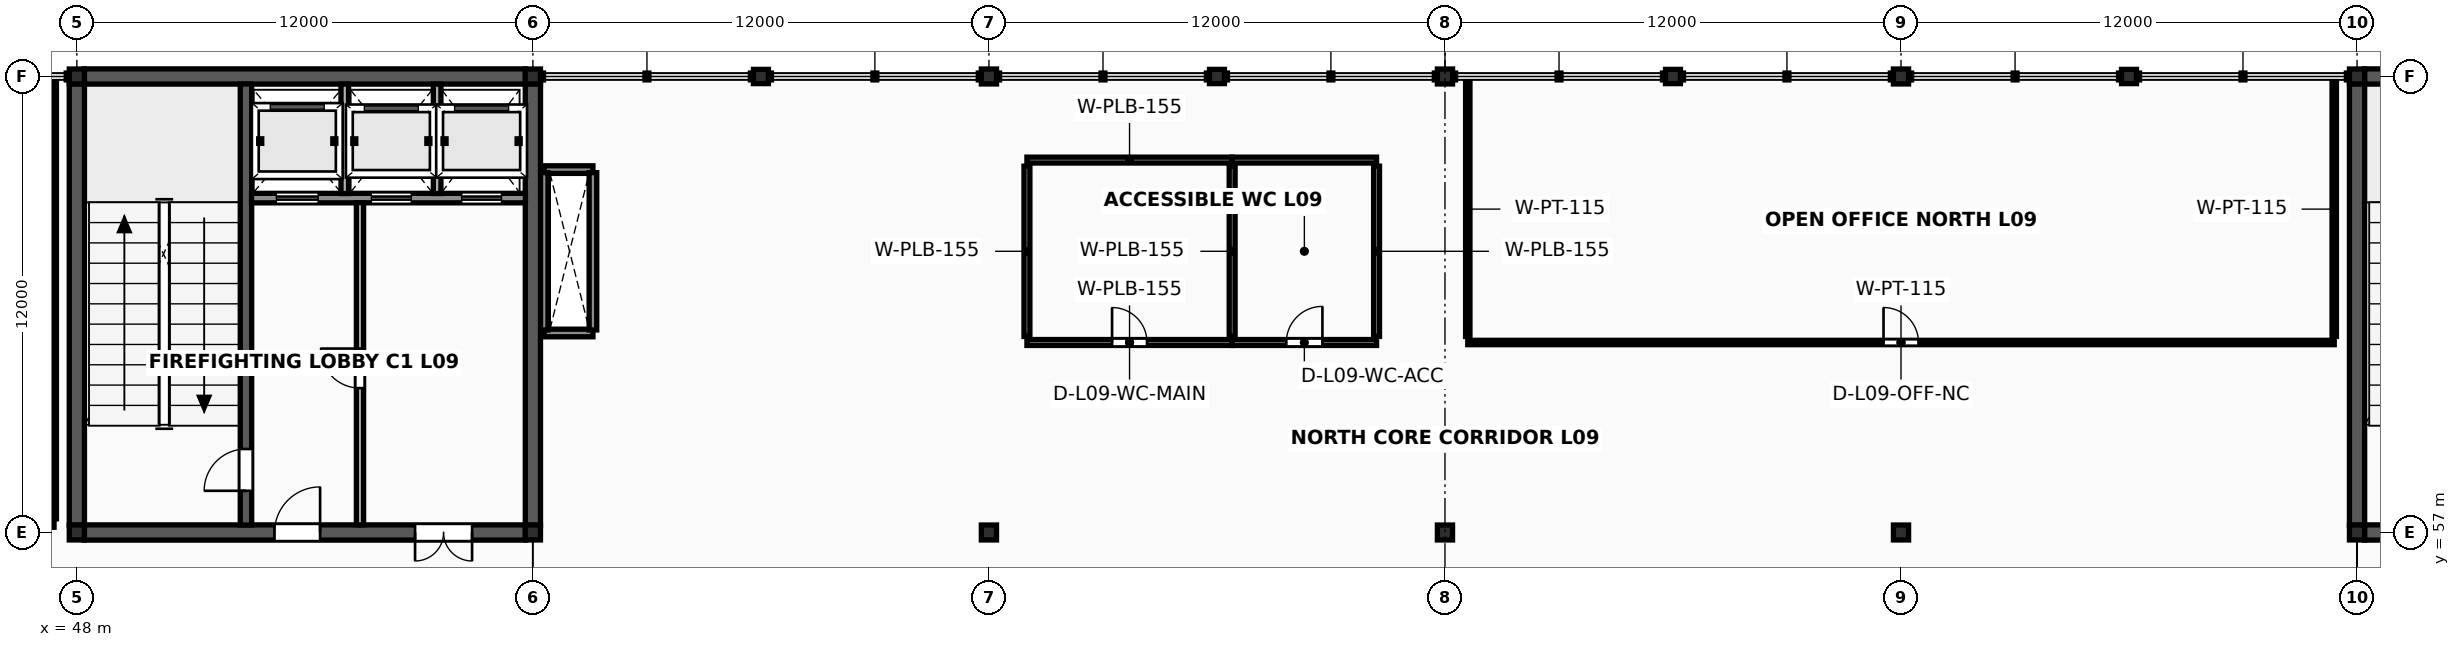
"""IFC4 building model, lengths in metres.
Left out: names, types, materials, properties, quantities, classifications, styles, units other than length and angle.
Written with IfcOpenShell. Run it as: python <this file> out.ifc"""

import sys

from ifc_helpers import new_model, si_unit, direction, frame, frame_2d, origin, origin_2d, place, context, subcontext, project, spatial, rectangle, i_section, extrude, element, fill, save


model = new_model("IFC4")
c1 = context("Model", 3, precision=1e-05, world=origin(), true_north=direction((0.0, 1.0)))
c2 = subcontext(c1, "Body", "Model", "MODEL_VIEW")
j1 = project(units=[si_unit("LENGTHUNIT", "METRE"), si_unit("PLANEANGLEUNIT", "RADIAN")], contexts=[c1])
p1 = place(None, origin())
s1 = spatial("IfcSite", under=j1, at=p1, CompositionType="ELEMENT")
p2 = place(p1, origin())
s2 = spatial("IfcBuilding", under=s1, at=p2, CompositionType="ELEMENT")
p3 = place(p2, frame((0.0, 0.0, 37.6)))
s3 = spatial("IfcBuildingStorey", under=s2, at=p3, CompositionType="ELEMENT", Elevation=37.6)
for number, where, z_axis, x_axis in (
    (1, (48.0, 57.0, 0.0), (0.0, 0.0, 1.0), (1.0, 0.0, 0.0)),
    (2, (48.0, 69.0, 0.0), (0.0, 0.0, 1.0), (1.0, 0.0, 0.0)),
    (3, (60.0, 57.0, 0.0), (0.0, 0.0, 1.0), (1.0, 0.0, 0.0)),
    (4, (60.0, 69.0, 0.0), (0.0, 0.0, 1.0), (1.0, 0.0, 0.0)),
    (5, (72.0, 57.0, 0.0), (0.0, 0.0, 1.0), (1.0, 0.0, 0.0)),
    (6, (72.0, 69.0, 0.0), (0.0, 0.0, 1.0), (1.0, 0.0, 0.0)),
    (7, (84.0, 57.0, 0.0), (0.0, 0.0, 1.0), (1.0, 0.0, 0.0)),
    (8, (84.0, 69.0, 0.0), (0.0, 0.0, 1.0), (1.0, 0.0, 0.0)),
    (9, (96.0, 57.0, 0.0), (0.0, 0.0, 1.0), (1.0, 0.0, 0.0)),
    (10, (96.0, 69.0, 0.0), (0.0, 0.0, 1.0), (1.0, 0.0, 0.0)),
    (11, (108.0, 57.0, 0.0), (0.0, 0.0, 1.0), (1.0, 0.0, 0.0)),
    (12, (108.0, 69.0, 0.0), (0.0, 0.0, 1.0), (1.0, 0.0, 0.0)),
):
    element("IfcColumn", number, at=place(p3, frame(where, z_axis=z_axis, x_axis=x_axis)), inside=s3, PredefinedType="COLUMN", context=c2, shape_type="SweptSolid", body=[
        extrude(i_section(OverallWidth=0.399, OverallDepth=0.393, WebThickness=0.023, FlangeThickness=0.037, FilletRadius=0.018, at=origin_2d()), origin(), (0.0, 0.0, 1.0), 4.0),
    ])
for number, where, z_axis, x_axis in (
    (13, (66.0, 69.0, 0.0), (0.0, 0.0, 1.0), (1.0, 0.0, 0.0)),
    (14, (78.0, 69.0, 0.0), (0.0, 0.0, 1.0), (1.0, 0.0, 0.0)),
    (15, (90.0, 69.0, 0.0), (0.0, 0.0, 1.0), (1.0, 0.0, 0.0)),
    (16, (102.0, 69.0, 0.0), (0.0, 0.0, 1.0), (1.0, 0.0, 0.0)),
):
    element("IfcColumn", number, at=place(p3, frame(where, z_axis=z_axis, x_axis=x_axis)), inside=s3, PredefinedType="COLUMN", context=c2, shape_type="SweptSolid", body=[
        extrude(i_section(OverallWidth=0.394, OverallDepth=0.375, WebThickness=0.017, FlangeThickness=0.028, FilletRadius=0.018, at=origin_2d()), origin(), (0.0, 0.0, 1.0), 4.0),
    ])
for number, where, z_axis, x_axis in (
    (17, (60.297, 62.25, 0.0), (0.0, 0.0, 1.0), (1.0, 0.0, 0.0)),
    (18, (60.297, 66.55, 0.0), (0.0, 0.0, 1.0), (1.0, 0.0, 0.0)),
):
    element("IfcWall", number, at=place(p3, frame(where, z_axis=z_axis, x_axis=x_axis)), inside=s3, PredefinedType="SOLIDWALL", context=c2, shape_type="SweptSolid", body=[
        extrude(rectangle(XDim=1.283, YDim=0.2, at=frame_2d((0.642, 0.0))), origin(), (0.0, 0.0, 1.0), 3.838),
    ])
for number, where, z_axis, x_axis in (
    (19, (60.297, 62.33, 0.0), (0.0, 0.0, 1.0), (0.0, 1.0, 0.0)),
    (20, (61.58, 62.33, 0.0), (0.0, 0.0, 1.0), (0.0, 1.0, 0.0)),
):
    element("IfcWall", number, at=place(p3, frame(where, z_axis=z_axis, x_axis=x_axis)), inside=s3, PredefinedType="SOLIDWALL", context=c2, shape_type="SweptSolid", body=[
        extrude(rectangle(XDim=4.14, YDim=0.2, at=frame_2d((2.07, 0.0))), origin(), (0.0, 0.0, 1.0), 3.838),
    ])
p4 = place(p3, frame((48.197, 57.0, 0.0), z_axis=(0.0, 0.0, 1.0), x_axis=(1.0, 0.0, 0.0)))
e21 = element("IfcWall", 21, at=p4, inside=s3, PredefinedType="SHEAR", context=c2, shape_type="SweptSolid", body=[
    extrude(rectangle(XDim=11.607, YDim=0.4, at=frame_2d((5.803, 0.0))), origin(), (0.0, 0.0, 1.0), 3.838),
])
p5 = place(p4, frame((5.004, 0.0, 0.0)))
e22 = element("IfcOpeningElement", 22, at=p5, cuts=e21, PredefinedType="OPENING", context=c2, shape_type="SweptSolid", body=[
    extrude(rectangle(XDim=1.2, YDim=2.2, at=frame_2d((0.6, 1.1))), frame((0.0, 0.215, 0.0), z_axis=(0.0, -1.0, 0.0), x_axis=(1.0, 0.0, 0.0)), (0.0, 0.0, 1.0), 0.43),
])
p6 = place(p4, frame((8.703, 0.0, 0.0)))
e23 = element("IfcOpeningElement", 23, at=p6, cuts=e21, PredefinedType="OPENING", context=c2, shape_type="SweptSolid", body=[
    extrude(rectangle(XDim=1.5, YDim=2.25, at=frame_2d((0.75, 1.125))), frame((0.0, 0.215, 0.0), z_axis=(0.0, -1.0, 0.0), x_axis=(1.0, 0.0, 0.0)), (0.0, 0.0, 1.0), 0.43),
])
p7 = place(p3, frame((48.197, 69.0, 0.0), z_axis=(0.0, 0.0, 1.0), x_axis=(1.0, 0.0, 0.0)))
e24 = element("IfcWall", 24, at=p7, inside=s3, PredefinedType="SHEAR", context=c2, shape_type="SweptSolid", body=[
    extrude(rectangle(XDim=11.607, YDim=0.4, at=frame_2d((5.803, 0.0))), origin(), (0.0, 0.0, 1.0), 3.838),
])
for number, where, z_axis, x_axis in (
    (25, (48.0, 57.194, 0.0), (0.0, 0.0, 1.0), (0.0, 1.0, 0.0)),
    (26, (60.0, 57.194, 0.0), (0.0, 0.0, 1.0), (0.0, 1.0, 0.0)),
):
    element("IfcWall", number, at=place(p3, frame(where, z_axis=z_axis, x_axis=x_axis)), inside=s3, PredefinedType="SHEAR", context=c2, shape_type="SweptSolid", body=[
        extrude(rectangle(XDim=11.613, YDim=0.4, at=frame_2d((5.806, 0.0))), origin(), (0.0, 0.0, 1.0), 3.838),
    ])
p8 = place(p3, frame((52.45, 57.197, 0.0), z_axis=(0.0, 0.0, 1.0), x_axis=(0.0, 1.0, 0.0)))
e27 = element("IfcWall", 27, at=p8, inside=s3, PredefinedType="SHEAR", context=c2, shape_type="SweptSolid", body=[
    extrude(rectangle(XDim=11.606, YDim=0.3, at=frame_2d((5.803, 0.0))), origin(), (0.0, 0.0, 1.0), 3.838),
])
p9 = place(p8, frame((0.9, 0.0, 0.0)))
e28 = element("IfcOpeningElement", 28, at=p9, cuts=e27, PredefinedType="OPENING", context=c2, shape_type="SweptSolid", body=[
    extrude(rectangle(XDim=1.1, YDim=2.2, at=frame_2d((0.55, 1.1))), frame((0.0, 0.165, 0.0), z_axis=(0.0, -1.0, 0.0), x_axis=(1.0, 0.0, 0.0)), (0.0, 0.0, 1.0), 0.33),
])
p10 = place(p3, frame((52.597, 65.8, 0.0), z_axis=(0.0, 0.0, 1.0), x_axis=(1.0, 0.0, 0.0)))
e29 = element("IfcWall", 29, at=p10, inside=s3, PredefinedType="SOLIDWALL", context=c2, shape_type="SweptSolid", body=[
    extrude(rectangle(XDim=7.206, YDim=0.25, at=frame_2d((3.603, 0.0))), origin(), (0.0, 0.0, 1.0), 3.838),
])
p11 = place(p10, frame((0.653, 0.0, 0.0)))
e30 = element("IfcOpeningElement", 30, at=p11, cuts=e29, PredefinedType="OPENING", context=c2, shape_type="SweptSolid", body=[
    extrude(rectangle(XDim=1.1, YDim=2.24, at=frame_2d((0.55, 1.12))), frame((0.0, 0.14, 0.0), z_axis=(0.0, -1.0, 0.0), x_axis=(1.0, 0.0, 0.0)), (0.0, 0.0, 1.0), 0.28),
])
p12 = place(p10, frame((3.153, 0.0, 0.0)))
e31 = element("IfcOpeningElement", 31, at=p12, cuts=e29, PredefinedType="OPENING", context=c2, shape_type="SweptSolid", body=[
    extrude(rectangle(XDim=1.05, YDim=2.2, at=frame_2d((0.525, 1.1))), frame((0.0, 0.14, 0.0), z_axis=(0.0, -1.0, 0.0), x_axis=(1.0, 0.0, 0.0)), (0.0, 0.0, 1.0), 0.28),
])
p13 = place(p10, frame((5.528, 0.0, 0.0)))
e32 = element("IfcOpeningElement", 32, at=p13, cuts=e29, PredefinedType="OPENING", context=c2, shape_type="SweptSolid", body=[
    extrude(rectangle(XDim=1.05, YDim=2.2, at=frame_2d((0.525, 1.1))), frame((0.0, 0.14, 0.0), z_axis=(0.0, -1.0, 0.0), x_axis=(1.0, 0.0, 0.0)), (0.0, 0.0, 1.0), 0.28),
])
for number, where, z_axis, x_axis in (
    (33, (55.05, 65.92, 0.0), (0.0, 0.0, 1.0), (0.0, 1.0, 0.0)),
    (34, (57.48, 65.92, 0.0), (0.0, 0.0, 1.0), (0.0, 1.0, 0.0)),
):
    element("IfcWall", number, at=place(p3, frame(where, z_axis=z_axis, x_axis=x_axis)), inside=s3, PredefinedType="SOLIDWALL", context=c2, shape_type="SweptSolid", body=[
        extrude(rectangle(XDim=2.88, YDim=0.2, at=frame_2d((1.44, 0.0))), origin(), (0.0, 0.0, 1.0), 3.828),
    ])
p14 = place(p3, frame((55.45, 57.2, 0.0), z_axis=(0.0, 0.0, 1.0), x_axis=(0.0, 1.0, 0.0)))
e35 = element("IfcWall", 35, at=p14, inside=s3, PredefinedType="SOLIDWALL", context=c2, shape_type="SweptSolid", body=[
    extrude(rectangle(XDim=8.48, YDim=0.19, at=frame_2d((4.24, 0.0))), origin(), (0.0, 0.0, 1.0), 3.828),
])
p15 = place(p14, frame((3.6, 0.0, 0.0)))
e36 = element("IfcOpeningElement", 36, at=p15, cuts=e35, PredefinedType="OPENING", context=c2, shape_type="SweptSolid", body=[
    extrude(rectangle(XDim=1.04, YDim=2.18, at=frame_2d((0.52, 1.09))), frame((0.0, 0.11, 0.0), z_axis=(0.0, -1.0, 0.0), x_axis=(1.0, 0.0, 0.0)), (0.0, 0.0, 1.0), 0.22),
])
p16 = place(p3, frame((108.197, 57.0, 0.0), z_axis=(0.0, 0.0, 1.0), x_axis=(1.0, 0.0, 0.0)))
e37 = element("IfcWall", 37, at=p16, inside=s3, PredefinedType="SHEAR", context=c2, shape_type="SweptSolid", body=[
    extrude(rectangle(XDim=11.607, YDim=0.4, at=frame_2d((5.803, 0.0))), origin(), (0.0, 0.0, 1.0), 3.838),
])
p17 = place(p16, frame((5.004, 0.0, 0.0)))
e38 = element("IfcOpeningElement", 38, at=p17, cuts=e37, PredefinedType="OPENING", context=c2, shape_type="SweptSolid", body=[
    extrude(rectangle(XDim=1.2, YDim=2.2, at=frame_2d((0.6, 1.1))), frame((0.0, 0.215, 0.0), z_axis=(0.0, -1.0, 0.0), x_axis=(1.0, 0.0, 0.0)), (0.0, 0.0, 1.0), 0.43),
])
p18 = place(p16, frame((8.704, 0.0, 0.0)))
e39 = element("IfcOpeningElement", 39, at=p18, cuts=e37, PredefinedType="OPENING", context=c2, shape_type="SweptSolid", body=[
    extrude(rectangle(XDim=1.5, YDim=2.25, at=frame_2d((0.75, 1.125))), frame((0.0, 0.215, 0.0), z_axis=(0.0, -1.0, 0.0), x_axis=(1.0, 0.0, 0.0)), (0.0, 0.0, 1.0), 0.43),
])
p19 = place(p3, frame((108.197, 69.0, 0.0), z_axis=(0.0, 0.0, 1.0), x_axis=(1.0, 0.0, 0.0)))
e40 = element("IfcWall", 40, at=p19, inside=s3, PredefinedType="SHEAR", context=c2, shape_type="SweptSolid", body=[
    extrude(rectangle(XDim=11.607, YDim=0.4, at=frame_2d((5.803, 0.0))), origin(), (0.0, 0.0, 1.0), 3.838),
])
p20 = place(p3, frame((108.0, 57.194, 0.0), z_axis=(0.0, 0.0, 1.0), x_axis=(0.0, 1.0, 0.0)))
e41 = element("IfcWall", 41, at=p20, inside=s3, PredefinedType="SHEAR", context=c2, shape_type="SweptSolid", body=[
    extrude(rectangle(XDim=11.613, YDim=0.4, at=frame_2d((5.806, 0.0))), origin(), (0.0, 0.0, 1.0), 3.838),
])
p21 = place(p3, frame((73.0, 62.0, 0.0), z_axis=(0.0, 0.0, 1.0), x_axis=(1.0, 0.0, 0.0)))
e42 = element("IfcWall", 42, at=p21, inside=s3, PredefinedType="PLUMBINGWALL", context=c2, shape_type="SweptSolid", body=[
    extrude(rectangle(XDim=5.4, YDim=0.155, at=frame_2d((2.7, 0.0))), origin(), (0.0, 0.0, 1.0), 2.88),
])
p22 = place(p21, frame((2.24, 0.0, 0.0)))
e43 = element("IfcOpeningElement", 43, at=p22, cuts=e42, PredefinedType="OPENING", context=c2, shape_type="SweptSolid", body=[
    extrude(rectangle(XDim=0.92, YDim=2.1, at=frame_2d((0.46, 1.05))), frame((0.0, 0.093, 0.0), z_axis=(0.0, -1.0, 0.0), x_axis=(1.0, 0.0, 0.0)), (0.0, 0.0, 1.0), 0.185),
])
p23 = place(p3, frame((73.0, 66.8, 0.0), z_axis=(0.0, 0.0, 1.0), x_axis=(1.0, 0.0, 0.0)))
e44 = element("IfcWall", 44, at=p23, inside=s3, PredefinedType="PLUMBINGWALL", context=c2, shape_type="SweptSolid", body=[
    extrude(rectangle(XDim=5.4, YDim=0.155, at=frame_2d((2.7, 0.0))), origin(), (0.0, 0.0, 1.0), 2.88),
])
for number, where, z_axis, x_axis in (
    (45, (73.0, 62.16, 0.0), (0.0, 0.0, 1.0), (0.0, 1.0, 0.0)),
    (46, (78.4, 62.16, 0.0), (0.0, 0.0, 1.0), (0.0, 1.0, 0.0)),
):
    element("IfcWall", number, at=place(p3, frame(where, z_axis=z_axis, x_axis=x_axis)), inside=s3, PredefinedType="PLUMBINGWALL", context=c2, shape_type="SweptSolid", body=[
        extrude(rectangle(XDim=4.48, YDim=0.155, at=frame_2d((2.24, 0.0))), origin(), (0.0, 0.0, 1.0), 2.88),
    ])
p24 = place(p3, frame((78.4, 62.0, 0.0), z_axis=(0.0, 0.0, 1.0), x_axis=(1.0, 0.0, 0.0)))
e47 = element("IfcWall", 47, at=p24, inside=s3, PredefinedType="PLUMBINGWALL", context=c2, shape_type="SweptSolid", body=[
    extrude(rectangle(XDim=3.8, YDim=0.155, at=frame_2d((1.9, 0.0))), origin(), (0.0, 0.0, 1.0), 2.88),
])
p25 = place(p24, frame((1.425, 0.0, 0.0)))
e48 = element("IfcOpeningElement", 48, at=p25, cuts=e47, PredefinedType="OPENING", context=c2, shape_type="SweptSolid", body=[
    extrude(rectangle(XDim=0.95, YDim=2.13, at=frame_2d((0.475, 1.065))), frame((0.0, 0.093, 0.0), z_axis=(0.0, -1.0, 0.0), x_axis=(1.0, 0.0, 0.0)), (0.0, 0.0, 1.0), 0.185),
])
p26 = place(p3, frame((78.4, 66.8, 0.0), z_axis=(0.0, 0.0, 1.0), x_axis=(1.0, 0.0, 0.0)))
e49 = element("IfcWall", 49, at=p26, inside=s3, PredefinedType="PLUMBINGWALL", context=c2, shape_type="SweptSolid", body=[
    extrude(rectangle(XDim=3.8, YDim=0.155, at=frame_2d((1.9, 0.0))), origin(), (0.0, 0.0, 1.0), 2.88),
])
p27 = place(p3, frame((82.2, 62.16, 0.0), z_axis=(0.0, 0.0, 1.0), x_axis=(0.0, 1.0, 0.0)))
e50 = element("IfcWall", 50, at=p27, inside=s3, PredefinedType="PLUMBINGWALL", context=c2, shape_type="SweptSolid", body=[
    extrude(rectangle(XDim=4.48, YDim=0.155, at=frame_2d((2.24, 0.0))), origin(), (0.0, 0.0, 1.0), 2.88),
])
p28 = place(p3, frame((24.14, 57.2, 0.0), z_axis=(0.0, 0.0, 1.0), x_axis=(1.0, 0.0, 0.0)))
e51 = element("IfcWall", 51, at=p28, inside=s3, PredefinedType="PARTITIONING", context=c2, shape_type="SweptSolid", body=[
    extrude(rectangle(XDim=23.26, YDim=0.125, at=frame_2d((11.63, 0.0))), origin(), (0.0, 0.0, 1.0), 2.88),
])
p29 = place(p28, frame((7.133, 0.0, 0.0)))
e52 = element("IfcOpeningElement", 52, at=p29, cuts=e51, PredefinedType="OPENING", context=c2, shape_type="SweptSolid", body=[
    extrude(rectangle(XDim=1.55, YDim=2.31, at=frame_2d((0.775, 1.155))), frame((0.0, 0.077, 0.0), z_axis=(0.0, -1.0, 0.0), x_axis=(1.0, 0.0, 0.0)), (0.0, 0.0, 1.0), 0.155),
])
p30 = place(p3, frame((47.4, 57.36, 0.0), z_axis=(0.0, 0.0, 1.0), x_axis=(0.0, 1.0, 0.0)))
e53 = element("IfcWall", 53, at=p30, inside=s3, PredefinedType="PARTITIONING", context=c2, shape_type="SweptSolid", body=[
    extrude(rectangle(XDim=11.5, YDim=0.125, at=frame_2d((5.75, 0.0))), origin(), (0.0, 0.0, 1.0), 2.88),
])
p31 = place(p3, frame((84.6, 62.0, 0.0), z_axis=(0.0, 0.0, 1.0), x_axis=(1.0, 0.0, 0.0)))
e54 = element("IfcWall", 54, at=p31, inside=s3, PredefinedType="PARTITIONING", context=c2, shape_type="SweptSolid", body=[
    extrude(rectangle(XDim=22.8, YDim=0.115, at=frame_2d((11.4, 0.0))), origin(), (0.0, 0.0, 1.0), 2.88),
])
p32 = place(p31, frame((10.94, 0.0, 0.0)))
e55 = element("IfcOpeningElement", 55, at=p32, cuts=e54, PredefinedType="OPENING", context=c2, shape_type="SweptSolid", body=[
    extrude(rectangle(XDim=0.92, YDim=2.1, at=frame_2d((0.46, 1.05))), frame((0.0, 0.073, 0.0), z_axis=(0.0, -1.0, 0.0), x_axis=(1.0, 0.0, 0.0)), (0.0, 0.0, 1.0), 0.145),
])
for number, where, z_axis, x_axis in (
    (56, (84.6, 62.16, 0.0), (0.0, 0.0, 1.0), (0.0, 1.0, 0.0)),
    (57, (107.4, 62.16, 0.0), (0.0, 0.0, 1.0), (0.0, 1.0, 0.0)),
):
    element("IfcWall", number, at=place(p3, frame(where, z_axis=z_axis, x_axis=x_axis)), inside=s3, PredefinedType="PARTITIONING", context=c2, shape_type="SweptSolid", body=[
        extrude(rectangle(XDim=6.7, YDim=0.115, at=frame_2d((3.35, 0.0))), origin(), (0.0, 0.0, 1.0), 2.88),
    ])
p33 = place(p9, origin())
e58 = element("IfcDoor", 58, at=p33, inside=s3, OperationType="SINGLE_SWING_LEFT", PredefinedType="DOOR", context=c2, shape_type="SweptSolid", body=[
    extrude(rectangle(XDim=1.1, YDim=2.2, at=frame_2d((0.55, 1.1))), frame((0.0, 0.025, 0.0), z_axis=(0.0, -1.0, 0.0), x_axis=(1.0, 0.0, 0.0)), (0.0, 0.0, 1.0), 0.05),
])
fill(e28, e58)
p34 = place(p15, origin())
e59 = element("IfcDoor", 59, at=p34, inside=s3, OperationType="SINGLE_SWING_RIGHT", PredefinedType="DOOR", context=c2, shape_type="SweptSolid", body=[
    extrude(rectangle(XDim=1.04, YDim=2.18, at=frame_2d((0.52, 1.09))), frame((0.0, 0.025, 0.0), z_axis=(0.0, -1.0, 0.0), x_axis=(1.0, 0.0, 0.0)), (0.0, 0.0, 1.0), 0.05),
])
fill(e36, e59)
p35 = place(p5, origin())
e60 = element("IfcDoor", 60, at=p35, inside=s3, OperationType="SINGLE_SWING_RIGHT", PredefinedType="DOOR", context=c2, shape_type="SweptSolid", body=[
    extrude(rectangle(XDim=1.2, YDim=2.2, at=frame_2d((0.6, 1.1))), frame((0.0, 0.025, 0.0), z_axis=(0.0, -1.0, 0.0), x_axis=(1.0, 0.0, 0.0)), (0.0, 0.0, 1.0), 0.05),
])
fill(e22, e60)
p36 = place(p6, origin())
e61 = element("IfcDoor", 61, at=p36, inside=s3, OperationType="DOUBLE_DOOR_SINGLE_SWING", PredefinedType="DOOR", context=c2, shape_type="SweptSolid", body=[
    extrude(rectangle(XDim=1.5, YDim=2.25, at=frame_2d((0.75, 1.125))), frame((0.0, 0.025, 0.0), z_axis=(0.0, -1.0, 0.0), x_axis=(1.0, 0.0, 0.0)), (0.0, 0.0, 1.0), 0.05),
])
fill(e23, e61)
p37 = place(p11, origin())
e62 = element("IfcDoor", 62, at=p37, inside=s3, OperationType="SLIDING_TO_LEFT", PredefinedType="USERDEFINED", context=c2, shape_type="SweptSolid", body=[
    extrude(rectangle(XDim=1.1, YDim=2.24, at=frame_2d((0.55, 1.12))), frame((0.0, 0.025, 0.0), z_axis=(0.0, -1.0, 0.0), x_axis=(1.0, 0.0, 0.0)), (0.0, 0.0, 1.0), 0.05),
])
fill(e30, e62)
p38 = place(p12, origin())
e63 = element("IfcDoor", 63, at=p38, inside=s3, OperationType="SLIDING_TO_LEFT", PredefinedType="USERDEFINED", context=c2, shape_type="SweptSolid", body=[
    extrude(rectangle(XDim=1.05, YDim=2.2, at=frame_2d((0.525, 1.1))), frame((0.0, 0.025, 0.0), z_axis=(0.0, -1.0, 0.0), x_axis=(1.0, 0.0, 0.0)), (0.0, 0.0, 1.0), 0.05),
])
fill(e31, e63)
p39 = place(p13, origin())
e64 = element("IfcDoor", 64, at=p39, inside=s3, OperationType="SLIDING_TO_LEFT", PredefinedType="USERDEFINED", context=c2, shape_type="SweptSolid", body=[
    extrude(rectangle(XDim=1.05, YDim=2.2, at=frame_2d((0.525, 1.1))), frame((0.0, 0.025, 0.0), z_axis=(0.0, -1.0, 0.0), x_axis=(1.0, 0.0, 0.0)), (0.0, 0.0, 1.0), 0.05),
])
fill(e32, e64)
p40 = place(p22, origin())
e65 = element("IfcDoor", 65, at=p40, inside=s3, OperationType="SINGLE_SWING_LEFT", PredefinedType="DOOR", context=c2, shape_type="SweptSolid", body=[
    extrude(rectangle(XDim=0.92, YDim=2.1, at=frame_2d((0.46, 1.05))), frame((0.0, 0.025, 0.0), z_axis=(0.0, -1.0, 0.0), x_axis=(1.0, 0.0, 0.0)), (0.0, 0.0, 1.0), 0.05),
])
fill(e43, e65)
p41 = place(p25, origin())
e66 = element("IfcDoor", 66, at=p41, inside=s3, OperationType="SINGLE_SWING_RIGHT", PredefinedType="DOOR", context=c2, shape_type="SweptSolid", body=[
    extrude(rectangle(XDim=0.95, YDim=2.13, at=frame_2d((0.475, 1.065))), frame((0.0, 0.025, 0.0), z_axis=(0.0, -1.0, 0.0), x_axis=(1.0, 0.0, 0.0)), (0.0, 0.0, 1.0), 0.05),
])
fill(e48, e66)
p42 = place(p32, origin())
e67 = element("IfcDoor", 67, at=p42, inside=s3, OperationType="SINGLE_SWING_LEFT", PredefinedType="DOOR", context=c2, shape_type="SweptSolid", body=[
    extrude(rectangle(XDim=0.92, YDim=2.1, at=frame_2d((0.46, 1.05))), frame((0.0, 0.025, 0.0), z_axis=(0.0, -1.0, 0.0), x_axis=(1.0, 0.0, 0.0)), (0.0, 0.0, 1.0), 0.05),
])
fill(e55, e67)
save(model, sys.argv[1])
